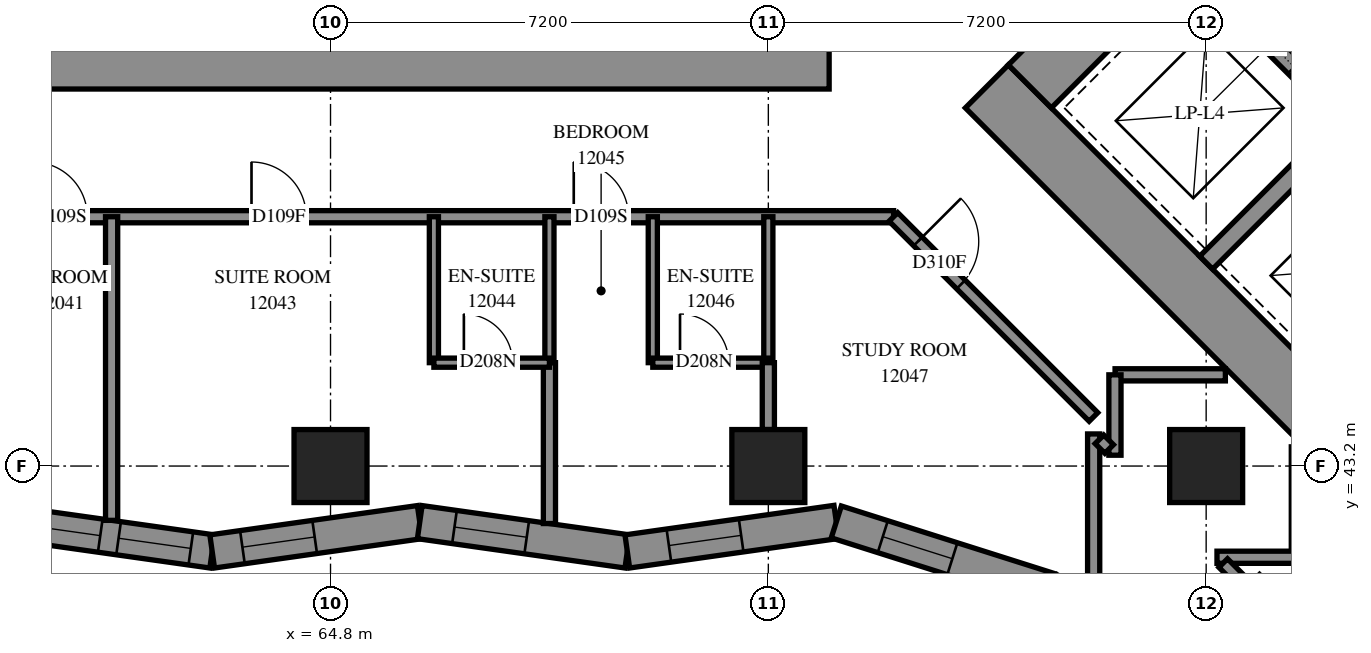
"""IFC4 building model, lengths in metres.
Left out: names, types, materials, properties, quantities, classifications, styles, units other than length and angle.
Written with IfcOpenShell. Run it as: python <this file> out.ifc"""

import sys

from ifc_helpers import new_model, si_unit, direction, frame, frame_2d, origin, origin_2d, place, context, subcontext, project, spatial, polyline, rectangle, outline, extrude, element, fill, save


model = new_model("IFC4")
c1 = context("Model", 3, precision=1e-05, world=origin(), true_north=direction((0.0, 1.0)))
c2 = subcontext(c1, "Body", "Model", "MODEL_VIEW")
j1 = project(units=[si_unit("LENGTHUNIT", "METRE"), si_unit("PLANEANGLEUNIT", "RADIAN")], contexts=[c1])
p1 = place(None, origin())
s1 = spatial("IfcSite", under=j1, at=p1, CompositionType="ELEMENT")
p2 = place(p1, origin())
s2 = spatial("IfcBuilding", under=s1, at=p2, CompositionType="ELEMENT")
p3 = place(p2, frame((0.0, 0.0, 47.4)))
s3 = spatial("IfcBuildingStorey", under=s2, at=p3, CompositionType="ELEMENT", Elevation=47.4)
for number, where, z_axis, x_axis in (
    (1, (64.8, 43.2, 0.0), (0.0, 0.0, 1.0), (1.0, 0.0, 0.0)),
    (2, (72.0, 43.2, 0.0), (0.0, 0.0, 1.0), (1.0, 0.0, 0.0)),
    (3, (79.2, 43.2, 0.0), (0.0, 0.0, 1.0), (1.0, 0.0, 0.0)),
):
    element("IfcColumn", number, at=place(p3, frame(where, z_axis=z_axis, x_axis=x_axis)), inside=s3, PredefinedType="COLUMN", context=c2, shape_type="SweptSolid", body=[
        extrude(rectangle(XDim=1.2, YDim=1.2, at=origin_2d()), origin(), (0.0, 0.0, 1.0), 3.1),
    ])
for number, where, z_axis, x_axis in (
    (4, (56.6, 49.9, -0.3), (0.0, 0.0, 1.0), (1.0, 0.0, 0.0)),
    (5, (75.594, 49.443, -0.3), (0.0, 0.0, 1.0), (0.707, -0.707, 0.0)),
):
    element("IfcWall", number, at=place(p3, frame(where, z_axis=z_axis, x_axis=x_axis)), inside=s3, PredefinedType="SHEAR", context=c2, shape_type="SweptSolid", body=[
        extrude(rectangle(XDim=16.4, YDim=1.0, at=frame_2d((8.2, 0.0))), origin(), (0.0, 0.0, 1.0), 2.7),
    ])
p4 = place(p3, frame((76.301, 49.443, -0.3), z_axis=(0.0, 0.0, 1.0), x_axis=(0.7071067812, 0.7071067812, 0.0)))
e6 = element("IfcWall", 6, at=p4, inside=s3, PredefinedType="SHEAR", context=c2, shape_type="SweptSolid", body=[
    extrude(rectangle(XDim=14.4, YDim=1.0, at=frame_2d((7.2, 0.0))), origin(), (0.0, 0.0, 1.0), 2.7),
])
p5 = place(p4, frame((4.55, 0.0, 0.3)))
e7 = element("IfcOpeningElement", 7, at=p5, cuts=e6, PredefinedType="OPENING", context=c2, shape_type="SweptSolid", body=[
    extrude(rectangle(XDim=1.1, YDim=2.1, at=frame_2d((0.55, 1.05))), frame((0.0, 0.51, 0.0), z_axis=(0.0, -1.0, 0.0), x_axis=(1.0, 0.0, 0.0)), (0.0, 0.0, 1.0), 1.02),
])
p6 = place(p4, frame((11.35, 0.0, 0.3)))
e8 = element("IfcOpeningElement", 8, at=p6, cuts=e6, PredefinedType="OPENING", context=c2, shape_type="SweptSolid", body=[
    extrude(rectangle(XDim=1.1, YDim=2.1, at=frame_2d((0.55, 1.05))), frame((0.0, 0.51, 0.0), z_axis=(0.0, -1.0, 0.0), x_axis=(1.0, 0.0, 0.0)), (0.0, 0.0, 1.0), 1.02),
])
p7 = place(p3, frame((79.2, 46.544, 0.0), z_axis=(0.0, 0.0, 1.0), x_axis=(0.7071219326, 0.7070916295, 0.0)))
e9 = element("IfcWall", 9, at=p7, inside=s3, PredefinedType="SOLIDWALL", context=c2, shape_type="SweptSolid", body=[
    extrude(rectangle(XDim=3.3, YDim=0.3, at=frame_2d((1.65, 0.0))), origin(), (0.0, 0.0, 1.0), 3.1),
])
p8 = place(p3, frame((78.988, 51.423, 0.0), z_axis=(0.0, 0.0, 1.0), x_axis=(0.7071067812, -0.7071067812, 0.0)))
e10 = element("IfcWall", 10, at=p8, inside=s3, PredefinedType="SOLIDWALL", context=c2, shape_type="SweptSolid", body=[
    extrude(rectangle(XDim=14.4, YDim=0.3, at=frame_2d((7.2, 0.0))), origin(), (0.0, 0.0, 1.0), 3.1),
])
p9 = place(p8, frame((1.25, 0.0, 0.0)))
e11 = element("IfcOpeningElement", 11, at=p9, cuts=e10, PredefinedType="OPENING", context=c2, shape_type="SweptSolid", body=[
    extrude(rectangle(XDim=1.1, YDim=2.1, at=frame_2d((0.55, 1.05))), frame((0.0, 0.16, 0.0), z_axis=(0.0, -1.0, 0.0), x_axis=(1.0, 0.0, 0.0)), (0.0, 0.0, 1.0), 0.32),
])
p10 = place(p8, frame((4.85, 0.0, 0.0)))
e12 = element("IfcOpeningElement", 12, at=p10, cuts=e10, PredefinedType="OPENING", context=c2, shape_type="SweptSolid", body=[
    extrude(rectangle(XDim=1.1, YDim=2.1, at=frame_2d((0.55, 1.05))), frame((0.0, 0.16, 0.0), z_axis=(0.0, -1.0, 0.0), x_axis=(1.0, 0.0, 0.0)), (0.0, 0.0, 1.0), 0.32),
])
p11 = place(p8, frame((8.45, 0.0, 0.0)))
e13 = element("IfcOpeningElement", 13, at=p11, cuts=e10, PredefinedType="OPENING", context=c2, shape_type="SweptSolid", body=[
    extrude(rectangle(XDim=1.1, YDim=2.1, at=frame_2d((0.55, 1.05))), frame((0.0, 0.16, 0.0), z_axis=(0.0, -1.0, 0.0), x_axis=(1.0, 0.0, 0.0)), (0.0, 0.0, 1.0), 0.32),
])
p12 = place(p8, frame((12.05, 0.0, 0.0)))
e14 = element("IfcOpeningElement", 14, at=p12, cuts=e10, PredefinedType="OPENING", context=c2, shape_type="SweptSolid", body=[
    extrude(rectangle(XDim=1.1, YDim=2.1, at=frame_2d((0.55, 1.05))), frame((0.0, 0.16, 0.0), z_axis=(0.0, -1.0, 0.0), x_axis=(1.0, 0.0, 0.0)), (0.0, 0.0, 1.0), 0.32),
])
p13 = place(p3, frame((59.44, 42.278, 0.0), z_axis=(0.0, 0.0, 1.0), x_axis=(0.9901773547, -0.1398170455, 0.0)))
e15 = element("IfcWall", 15, at=p13, inside=s3, PredefinedType="SOLIDWALL", context=c2, shape_type="SweptSolid", body=[
    extrude(outline(polyline([(0.039, -0.275), (3.486, -0.275), (3.409, 0.275), (-0.039, 0.275), (0.039, -0.275)])), origin(), (0.0, 0.0, 1.0), 3.1),
])
p14 = place(p13, frame((0.389, 0.0, 0.5)))
e16 = element("IfcOpeningElement", 16, at=p14, cuts=e15, PredefinedType="OPENING", context=c2, shape_type="SweptSolid", body=[
    extrude(rectangle(XDim=1.2, YDim=2.45, at=frame_2d((0.6, 1.225))), frame((0.0, 0.285, 0.0), z_axis=(0.0, -1.0, 0.0), x_axis=(1.0, 0.0, 0.0)), (0.0, 0.0, 1.0), 0.57),
])
p15 = place(p13, frame((1.893, 0.0, 0.5)))
e17 = element("IfcOpeningElement", 17, at=p15, cuts=e15, PredefinedType="OPENING", context=c2, shape_type="SweptSolid", body=[
    extrude(rectangle(XDim=1.2, YDim=2.45, at=frame_2d((0.6, 1.225))), frame((0.0, 0.285, 0.0), z_axis=(0.0, -1.0, 0.0), x_axis=(1.0, 0.0, 0.0)), (0.0, 0.0, 1.0), 0.57),
])
p16 = place(p3, frame((62.854, 41.796, 0.0), z_axis=(0.0, 0.0, 1.0), x_axis=(0.9901767876, 0.1398210616, 0.0)))
e18 = element("IfcWall", 18, at=p16, inside=s3, PredefinedType="SOLIDWALL", context=c2, shape_type="SweptSolid", body=[
    extrude(outline(polyline([(-0.039, -0.275), (3.409, -0.275), (3.486, 0.275), (0.039, 0.275), (-0.039, -0.275)])), origin(), (0.0, 0.0, 1.0), 3.1),
])
p17 = place(p16, frame((0.502, 0.0, 0.5)))
e19 = element("IfcOpeningElement", 19, at=p17, cuts=e18, PredefinedType="OPENING", context=c2, shape_type="SweptSolid", body=[
    extrude(rectangle(XDim=1.2, YDim=2.45, at=frame_2d((0.6, 1.225))), frame((0.0, 0.285, 0.0), z_axis=(0.0, -1.0, 0.0), x_axis=(1.0, 0.0, 0.0)), (0.0, 0.0, 1.0), 0.57),
])
p18 = place(p3, frame((66.267, 42.278, 0.0), z_axis=(0.0, 0.0, 1.0), x_axis=(0.9901773547, -0.1398170455, 0.0)))
e20 = element("IfcWall", 20, at=p18, inside=s3, PredefinedType="SOLIDWALL", context=c2, shape_type="SweptSolid", body=[
    extrude(outline(polyline([(0.039, -0.275), (3.486, -0.275), (3.409, 0.275), (-0.039, 0.275), (0.039, -0.275)])), origin(), (0.0, 0.0, 1.0), 3.1),
])
p19 = place(p18, frame((0.577, 0.0, 0.5)))
e21 = element("IfcOpeningElement", 21, at=p19, cuts=e20, PredefinedType="OPENING", context=c2, shape_type="SweptSolid", body=[
    extrude(rectangle(XDim=1.2, YDim=2.45, at=frame_2d((0.6, 1.225))), frame((0.0, 0.285, 0.0), z_axis=(0.0, -1.0, 0.0), x_axis=(1.0, 0.0, 0.0)), (0.0, 0.0, 1.0), 0.57),
])
p20 = place(p3, frame((69.681, 41.796, 0.0), z_axis=(0.0, 0.0, 1.0), x_axis=(0.9901775212, 0.1398158663, 0.0)))
e22 = element("IfcWall", 22, at=p20, inside=s3, PredefinedType="SOLIDWALL", context=c2, shape_type="SweptSolid", body=[
    extrude(outline(polyline([(-0.039, -0.275), (3.409, -0.275), (3.534, 0.275), (0.039, 0.275), (-0.039, -0.275)])), origin(), (0.0, 0.0, 1.0), 3.1),
])
p21 = place(p20, frame((0.691, 0.0, 0.5)))
e23 = element("IfcOpeningElement", 23, at=p21, cuts=e22, PredefinedType="OPENING", context=c2, shape_type="SweptSolid", body=[
    extrude(rectangle(XDim=1.2, YDim=2.45, at=frame_2d((0.6, 1.225))), frame((0.0, 0.285, 0.0), z_axis=(0.0, -1.0, 0.0), x_axis=(1.0, 0.0, 0.0)), (0.0, 0.0, 1.0), 0.57),
])
p22 = place(p3, frame((73.118, 42.281, 0.0), z_axis=(0.0, 0.0, 1.0), x_axis=(0.953263549, -0.3021400438, 0.0)))
e24 = element("IfcWall", 24, at=p22, inside=s3, PredefinedType="SOLIDWALL", context=c2, shape_type="SweptSolid", body=[
    extrude(outline(polyline([(0.062, -0.275), (3.643, -0.275), (3.7, 0.275), (-0.062, 0.275), (0.062, -0.275)])), origin(), (0.0, 0.0, 1.0), 3.1),
])
p23 = place(p22, frame((0.802, 0.0, 0.5)))
e25 = element("IfcOpeningElement", 25, at=p23, cuts=e24, PredefinedType="OPENING", context=c2, shape_type="SweptSolid", body=[
    extrude(rectangle(XDim=1.2, YDim=2.45, at=frame_2d((0.6, 1.225))), frame((0.0, 0.285, 0.0), z_axis=(0.0, -1.0, 0.0), x_axis=(1.0, 0.0, 0.0)), (0.0, 0.0, 1.0), 0.57),
])
p24 = place(p3, frame((54.5, 47.3, 0.0), z_axis=(0.0, 0.0, 1.0), x_axis=(1.0, 0.0, 0.0)))
e26 = element("IfcWall", 26, at=p24, inside=s3, PredefinedType="PARTITIONING", context=c2, shape_type="SweptSolid", body=[
    extrude(rectangle(XDim=19.56, YDim=0.2, at=frame_2d((9.78, 0.0))), origin(), (0.0, 0.0, 1.0), 3.1),
])
p25 = place(p24, frame((0.23, 0.0, 0.0)))
e27 = element("IfcOpeningElement", 27, at=p25, cuts=e26, PredefinedType="OPENING", context=c2, shape_type="SweptSolid", body=[
    extrude(rectangle(XDim=1.0, YDim=2.1, at=frame_2d((0.5, 1.05))), frame((0.0, 0.11, 0.0), z_axis=(0.0, -1.0, 0.0), x_axis=(1.0, 0.0, 0.0)), (0.0, 0.0, 1.0), 0.22),
])
p26 = place(p24, frame((5.4, 0.0, 0.0)))
e28 = element("IfcOpeningElement", 28, at=p26, cuts=e26, PredefinedType="OPENING", context=c2, shape_type="SweptSolid", body=[
    extrude(rectangle(XDim=0.9, YDim=2.1, at=frame_2d((0.45, 1.05))), frame((0.0, 0.11, 0.0), z_axis=(0.0, -1.0, 0.0), x_axis=(1.0, 0.0, 0.0)), (0.0, 0.0, 1.0), 0.22),
])
p27 = place(p24, frame((9.001, 0.0, 0.0)))
e29 = element("IfcOpeningElement", 29, at=p27, cuts=e26, PredefinedType="OPENING", context=c2, shape_type="SweptSolid", body=[
    extrude(rectangle(XDim=0.9, YDim=2.1, at=frame_2d((0.45, 1.05))), frame((0.0, 0.11, 0.0), z_axis=(0.0, -1.0, 0.0), x_axis=(1.0, 0.0, 0.0)), (0.0, 0.0, 1.0), 0.22),
])
p28 = place(p24, frame((14.3, 0.0, 0.0)))
e30 = element("IfcOpeningElement", 30, at=p28, cuts=e26, PredefinedType="OPENING", context=c2, shape_type="SweptSolid", body=[
    extrude(rectangle(XDim=0.9, YDim=2.1, at=frame_2d((0.45, 1.05))), frame((0.0, 0.11, 0.0), z_axis=(0.0, -1.0, 0.0), x_axis=(1.0, 0.0, 0.0)), (0.0, 0.0, 1.0), 0.22),
])
p29 = place(p3, frame((61.2, 42.307, 0.0), z_axis=(0.0, 0.0, 1.0), x_axis=(0.0, 1.0, 0.0)))
e31 = element("IfcWall", 31, at=p29, inside=s3, PredefinedType="PARTITIONING", context=c2, shape_type="SweptSolid", body=[
    extrude(rectangle(XDim=4.993, YDim=0.2, at=frame_2d((2.497, 0.0))), origin(), (0.0, 0.0, 1.0), 3.1),
])
p30 = place(p3, frame((74.057, 47.297, 0.0), z_axis=(0.0, 0.0, 1.0), x_axis=(0.7071067812, -0.7071067812, 0.0)))
e32 = element("IfcWall", 32, at=p30, inside=s3, PredefinedType="PARTITIONING", context=c2, shape_type="SweptSolid", body=[
    extrude(rectangle(XDim=4.653, YDim=0.2, at=frame_2d((2.326, 0.0))), origin(), (0.0, 0.0, 1.0), 3.1),
])
p31 = place(p30, frame((0.57, 0.0, 0.0)))
e33 = element("IfcOpeningElement", 33, at=p31, cuts=e32, PredefinedType="OPENING", context=c2, shape_type="SweptSolid", body=[
    extrude(rectangle(XDim=1.0, YDim=2.1, at=frame_2d((0.5, 1.05))), frame((0.0, 0.11, 0.0), z_axis=(0.0, -1.0, 0.0), x_axis=(1.0, 0.0, 0.0)), (0.0, 0.0, 1.0), 0.22),
])
p32 = place(p3, frame((77.35, 41.075, 0.0), z_axis=(0.0, 0.0, 1.0), x_axis=(0.0, 1.0, 0.0)))
e34 = element("IfcWall", 34, at=p32, inside=s3, PredefinedType="PARTITIONING", context=c2, shape_type="SweptSolid", body=[
    extrude(rectangle(XDim=2.653, YDim=0.2, at=frame_2d((1.327, 0.0))), origin(), (0.0, 0.0, 1.0), 3.1),
])
p33 = place(p3, frame((68.4, 42.254, 0.0), z_axis=(0.0, 0.0, 1.0), x_axis=(0.0, 1.0, 0.0)))
e35 = element("IfcWall", 35, at=p33, inside=s3, PredefinedType="PARTITIONING", context=c2, shape_type="SweptSolid", body=[
    extrude(rectangle(XDim=2.646, YDim=0.2, at=frame_2d((1.323, 0.0))), origin(), (0.0, 0.0, 1.0), 3.1),
])
for number, where, z_axis, x_axis in (
    (36, (66.5, 44.9, 0.0), (0.0, 0.0, 1.0), (0.0, 1.0, 0.0)),
    (37, (68.4, 44.9, 0.0), (0.0, 0.0, 1.0), (0.0, 1.0, 0.0)),
    (38, (70.1, 44.9, 0.0), (0.0, 0.0, 1.0), (0.0, 1.0, 0.0)),
    (39, (72.0, 44.9, 0.0), (0.0, 0.0, 1.0), (0.0, 1.0, 0.0)),
):
    element("IfcWall", number, at=place(p3, frame(where, z_axis=z_axis, x_axis=x_axis)), inside=s3, PredefinedType="PARTITIONING", context=c2, shape_type="SweptSolid", body=[
        extrude(rectangle(XDim=2.4, YDim=0.15, at=frame_2d((1.2, 0.0))), origin(), (0.0, 0.0, 1.0), 3.1),
    ])
p34 = place(p3, frame((66.5, 44.9, 0.0), z_axis=(0.0, 0.0, 1.0), x_axis=(1.0, 0.0, 0.0)))
e40 = element("IfcWall", 40, at=p34, inside=s3, PredefinedType="PARTITIONING", context=c2, shape_type="SweptSolid", body=[
    extrude(rectangle(XDim=1.9, YDim=0.15, at=frame_2d((0.95, 0.0))), origin(), (0.0, 0.0, 1.0), 3.1),
])
p35 = place(p34, frame((0.493, 0.0, 0.0)))
e41 = element("IfcOpeningElement", 41, at=p35, cuts=e40, PredefinedType="OPENING", context=c2, shape_type="SweptSolid", body=[
    extrude(rectangle(XDim=0.8, YDim=2.1, at=frame_2d((0.4, 1.05))), frame((0.0, 0.085, 0.0), z_axis=(0.0, -1.0, 0.0), x_axis=(1.0, 0.0, 0.0)), (0.0, 0.0, 1.0), 0.17),
])
p36 = place(p3, frame((70.1, 44.9, 0.0), z_axis=(0.0, 0.0, 1.0), x_axis=(1.0, 0.0, 0.0)))
e42 = element("IfcWall", 42, at=p36, inside=s3, PredefinedType="PARTITIONING", context=c2, shape_type="SweptSolid", body=[
    extrude(rectangle(XDim=1.9, YDim=0.15, at=frame_2d((0.95, 0.0))), origin(), (0.0, 0.0, 1.0), 3.1),
])
p37 = place(p36, frame((0.448, 0.0, 0.0)))
e43 = element("IfcOpeningElement", 43, at=p37, cuts=e42, PredefinedType="OPENING", context=c2, shape_type="SweptSolid", body=[
    extrude(rectangle(XDim=0.8, YDim=2.1, at=frame_2d((0.4, 1.05))), frame((0.0, 0.085, 0.0), z_axis=(0.0, -1.0, 0.0), x_axis=(1.0, 0.0, 0.0)), (0.0, 0.0, 1.0), 0.17),
])
for number, where, z_axis, x_axis in (
    (44, (77.702, 44.7, 0.0), (0.0, 0.0, 1.0), (1.0, 0.0, 0.0)),
    (45, (80.7, 41.702, 0.0), (0.0, 0.0, 1.0), (0.0, 1.0, 0.0)),
):
    element("IfcWall", number, at=place(p3, frame(where, z_axis=z_axis, x_axis=x_axis)), inside=s3, PredefinedType="PARTITIONING", context=c2, shape_type="SweptSolid", body=[
        extrude(rectangle(XDim=1.814, YDim=0.2, at=frame_2d((0.907, 0.0))), origin(), (0.0, 0.0, 1.0), 3.1),
    ])
for number, where, z_axis, x_axis in (
    (46, (77.7, 43.378, 0.0), (0.0, 0.0, 1.0), (0.0, 1.0, 0.0)),
    (47, (79.378, 41.7, 0.0), (0.0, 0.0, 1.0), (1.0, 0.0, 0.0)),
):
    element("IfcWall", number, at=place(p3, frame(where, z_axis=z_axis, x_axis=x_axis)), inside=s3, PredefinedType="PARTITIONING", context=c2, shape_type="SweptSolid", body=[
        extrude(rectangle(XDim=1.322, YDim=0.2, at=frame_2d((0.661, 0.0))), origin(), (0.0, 0.0, 1.0), 3.1),
    ])
p38 = place(p3, frame((72.0, 43.8, 0.0), z_axis=(0.0, 0.0, 1.0), x_axis=(0.0, 1.0, 0.0)))
e48 = element("IfcWall", 48, at=p38, inside=s3, PredefinedType="PARTITIONING", context=c2, shape_type="SweptSolid", body=[
    extrude(rectangle(XDim=1.1, YDim=0.2, at=frame_2d((0.55, 0.0))), origin(), (0.0, 0.0, 1.0), 3.1),
])
p39 = place(p3, frame((77.445, 43.64, 0.0), z_axis=(0.0, 0.0, 1.0), x_axis=(0.7071067812, -0.7071067812, 0.0)))
e49 = element("IfcWall", 49, at=p39, inside=s3, PredefinedType="PARTITIONING", context=c2, shape_type="SweptSolid", body=[
    extrude(rectangle(XDim=0.225, YDim=0.2, at=frame_2d((0.113, 0.0))), origin(), (0.0, 0.0, 1.0), 3.1),
])
p40 = place(p3, frame((79.481, 41.605, 0.0), z_axis=(0.0, 0.0, 1.0), x_axis=(0.7071067812, -0.7071067812, 0.0)))
e50 = element("IfcWall", 50, at=p40, inside=s3, PredefinedType="PARTITIONING", context=c2, shape_type="SweptSolid", body=[
    extrude(rectangle(XDim=0.355, YDim=0.2, at=frame_2d((0.177, 0.0))), origin(), (0.0, 0.0, 1.0), 3.1),
])
p41 = place(p14, origin())
e51 = element("IfcWindow", 51, at=p41, inside=s3, PartitioningType="SINGLE_PANEL", PredefinedType="WINDOW", context=c2, shape_type="SweptSolid", body=[
    extrude(rectangle(XDim=1.2, YDim=2.45, at=frame_2d((0.6, 1.225))), frame((0.0, 0.155, 0.0), z_axis=(0.0, -1.0, 0.0), x_axis=(1.0, 0.0, 0.0)), (0.0, 0.0, 1.0), 0.06),
])
fill(e16, e51)
p42 = place(p15, origin())
e52 = element("IfcWindow", 52, at=p42, inside=s3, PartitioningType="SINGLE_PANEL", PredefinedType="WINDOW", context=c2, shape_type="SweptSolid", body=[
    extrude(rectangle(XDim=1.2, YDim=2.45, at=frame_2d((0.6, 1.225))), frame((0.0, 0.155, 0.0), z_axis=(0.0, -1.0, 0.0), x_axis=(1.0, 0.0, 0.0)), (0.0, 0.0, 1.0), 0.06),
])
fill(e17, e52)
p43 = place(p17, origin())
e53 = element("IfcWindow", 53, at=p43, inside=s3, PartitioningType="SINGLE_PANEL", PredefinedType="WINDOW", context=c2, shape_type="SweptSolid", body=[
    extrude(rectangle(XDim=1.2, YDim=2.45, at=frame_2d((0.6, 1.225))), frame((0.0, 0.155, 0.0), z_axis=(0.0, -1.0, 0.0), x_axis=(1.0, 0.0, 0.0)), (0.0, 0.0, 1.0), 0.06),
])
fill(e19, e53)
p44 = place(p19, origin())
e54 = element("IfcWindow", 54, at=p44, inside=s3, PartitioningType="SINGLE_PANEL", PredefinedType="WINDOW", context=c2, shape_type="SweptSolid", body=[
    extrude(rectangle(XDim=1.2, YDim=2.45, at=frame_2d((0.6, 1.225))), frame((0.0, 0.155, 0.0), z_axis=(0.0, -1.0, 0.0), x_axis=(1.0, 0.0, 0.0)), (0.0, 0.0, 1.0), 0.06),
])
fill(e21, e54)
p45 = place(p21, origin())
e55 = element("IfcWindow", 55, at=p45, inside=s3, PartitioningType="SINGLE_PANEL", PredefinedType="WINDOW", context=c2, shape_type="SweptSolid", body=[
    extrude(rectangle(XDim=1.2, YDim=2.45, at=frame_2d((0.6, 1.225))), frame((0.0, 0.155, 0.0), z_axis=(0.0, -1.0, 0.0), x_axis=(1.0, 0.0, 0.0)), (0.0, 0.0, 1.0), 0.06),
])
fill(e23, e55)
p46 = place(p23, origin())
e56 = element("IfcWindow", 56, at=p46, inside=s3, PartitioningType="SINGLE_PANEL", PredefinedType="WINDOW", context=c2, shape_type="SweptSolid", body=[
    extrude(rectangle(XDim=1.2, YDim=2.45, at=frame_2d((0.6, 1.225))), frame((0.0, 0.155, 0.0), z_axis=(0.0, -1.0, 0.0), x_axis=(1.0, 0.0, 0.0)), (0.0, 0.0, 1.0), 0.06),
])
fill(e25, e56)
p47 = place(p9, origin())
e57 = element("IfcDoor", 57, at=p47, inside=s3, OperationType="SLIDING_TO_LEFT", PredefinedType="DOOR", context=c2, shape_type="SweptSolid", body=[
    extrude(rectangle(XDim=1.1, YDim=2.1, at=frame_2d((0.55, 1.05))), frame((0.0, 0.025, 0.0), z_axis=(0.0, -1.0, 0.0), x_axis=(1.0, 0.0, 0.0)), (0.0, 0.0, 1.0), 0.05),
])
fill(e11, e57)
p48 = place(p26, origin())
e58 = element("IfcDoor", 58, at=p48, inside=s3, OperationType="SINGLE_SWING_LEFT", PredefinedType="DOOR", context=c2, shape_type="SweptSolid", body=[
    extrude(rectangle(XDim=0.9, YDim=2.1, at=frame_2d((0.45, 1.05))), frame((0.0, 0.025, 0.0), z_axis=(0.0, -1.0, 0.0), x_axis=(1.0, 0.0, 0.0)), (0.0, 0.0, 1.0), 0.05),
])
fill(e28, e58)
p49 = place(p27, origin())
e59 = element("IfcDoor", 59, at=p49, inside=s3, OperationType="SINGLE_SWING_RIGHT", PredefinedType="DOOR", context=c2, shape_type="SweptSolid", body=[
    extrude(rectangle(XDim=0.9, YDim=2.1, at=frame_2d((0.45, 1.05))), frame((0.0, 0.025, 0.0), z_axis=(0.0, -1.0, 0.0), x_axis=(1.0, 0.0, 0.0)), (0.0, 0.0, 1.0), 0.05),
])
fill(e29, e59)
p50 = place(p35, origin())
e60 = element("IfcDoor", 60, at=p50, inside=s3, OperationType="SINGLE_SWING_RIGHT", PredefinedType="DOOR", context=c2, shape_type="SweptSolid", body=[
    extrude(rectangle(XDim=0.8, YDim=2.1, at=frame_2d((0.4, 1.05))), frame((0.0, 0.025, 0.0), z_axis=(0.0, -1.0, 0.0), x_axis=(1.0, 0.0, 0.0)), (0.0, 0.0, 1.0), 0.05),
])
fill(e41, e60)
p51 = place(p28, origin())
e61 = element("IfcDoor", 61, at=p51, inside=s3, OperationType="SINGLE_SWING_RIGHT", PredefinedType="DOOR", context=c2, shape_type="SweptSolid", body=[
    extrude(rectangle(XDim=0.9, YDim=2.1, at=frame_2d((0.45, 1.05))), frame((0.0, 0.025, 0.0), z_axis=(0.0, -1.0, 0.0), x_axis=(1.0, 0.0, 0.0)), (0.0, 0.0, 1.0), 0.05),
])
fill(e30, e61)
p52 = place(p37, origin())
e62 = element("IfcDoor", 62, at=p52, inside=s3, OperationType="SINGLE_SWING_RIGHT", PredefinedType="DOOR", context=c2, shape_type="SweptSolid", body=[
    extrude(rectangle(XDim=0.8, YDim=2.1, at=frame_2d((0.4, 1.05))), frame((0.0, 0.025, 0.0), z_axis=(0.0, -1.0, 0.0), x_axis=(1.0, 0.0, 0.0)), (0.0, 0.0, 1.0), 0.05),
])
fill(e43, e62)
p53 = place(p31, origin())
e63 = element("IfcDoor", 63, at=p53, inside=s3, OperationType="SINGLE_SWING_LEFT", PredefinedType="DOOR", context=c2, shape_type="SweptSolid", body=[
    extrude(rectangle(XDim=1.0, YDim=2.1, at=frame_2d((0.5, 1.05))), frame((0.0, 0.025, 0.0), z_axis=(0.0, -1.0, 0.0), x_axis=(1.0, 0.0, 0.0)), (0.0, 0.0, 1.0), 0.05),
])
fill(e33, e63)
save(model, sys.argv[1])
